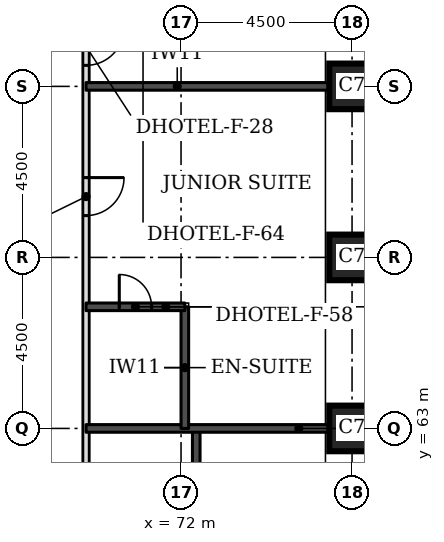
"""IFC4 building model, lengths in metres.
Left out: names, types, materials, properties, quantities, classifications, styles, units other than length and angle.
Written with IfcOpenShell. Run it as: python <this file> out.ifc"""

import sys

from ifc_helpers import new_model, si_unit, direction, frame, frame_2d, origin, origin_2d, place, context, subcontext, project, spatial, rectangle, extrude, element, fill, save


model = new_model("IFC4")
c1 = context("Model", 3, precision=1e-05, world=origin(), true_north=direction((0.0, 1.0)))
c2 = subcontext(c1, "Body", "Model", "MODEL_VIEW")
j1 = project(units=[si_unit("LENGTHUNIT", "METRE"), si_unit("PLANEANGLEUNIT", "RADIAN")], contexts=[c1])
p1 = place(None, origin())
s1 = spatial("IfcSite", under=j1, at=p1, CompositionType="ELEMENT")
p2 = place(p1, origin())
s2 = spatial("IfcBuilding", under=s1, at=p2, CompositionType="ELEMENT")
p3 = place(p2, frame((0.0, 0.0, 42.9)))
s3 = spatial("IfcBuildingStorey", under=s2, at=p3, CompositionType="ELEMENT", Elevation=42.9)
for number, where, z_axis, x_axis in (
    (1, (76.5, 63.0, 0.0), (0.0, 0.0, 1.0), (1.0, 0.0, 0.0)),
    (2, (76.5, 67.5, 0.0), (0.0, 0.0, 1.0), (1.0, 0.0, 0.0)),
    (3, (76.5, 72.0, 0.0), (0.0, 0.0, 1.0), (1.0, 0.0, 0.0)),
):
    element("IfcColumn", number, at=place(p3, frame(where, z_axis=z_axis, x_axis=x_axis)), inside=s3, PredefinedType="COLUMN", context=c2, shape_type="SweptSolid", body=[
        extrude(rectangle(XDim=1.2, YDim=1.2, at=origin_2d()), origin(), (0.0, 0.0, 1.0), 3.3),
    ])
p4 = place(p3, frame((69.5, 47.5, 0.0), z_axis=(0.0, 0.0, 1.0), x_axis=(0.0, 1.0, 0.0)))
e4 = element("IfcWall", 4, at=p4, inside=s3, PredefinedType="PARTITIONING", context=c2, shape_type="SweptSolid", body=[
    extrude(rectangle(XDim=26.5, YDim=0.15, at=frame_2d((13.25, 0.0))), origin(), (0.0, 0.0, 1.0), 3.08),
])
p5 = place(p4, frame((25.053, 0.0, 0.0)))
e5 = element("IfcOpeningElement", 5, at=p5, cuts=e4, PredefinedType="OPENING", context=c2, shape_type="SweptSolid", body=[
    extrude(rectangle(XDim=1.0, YDim=2.1, at=frame_2d((0.5, 1.05))), frame((0.0, 0.085, 0.0), z_axis=(0.0, -1.0, 0.0), x_axis=(1.0, 0.0, 0.0)), (0.0, 0.0, 1.0), 0.17),
])
p6 = place(p4, frame((21.1, 0.0, 0.0)))
e6 = element("IfcOpeningElement", 6, at=p6, cuts=e4, PredefinedType="OPENING", context=c2, shape_type="SweptSolid", body=[
    extrude(rectangle(XDim=1.0, YDim=2.1, at=frame_2d((0.5, 1.05))), frame((0.0, 0.085, 0.0), z_axis=(0.0, -1.0, 0.0), x_axis=(1.0, 0.0, 0.0)), (0.0, 0.0, 1.0), 0.17),
])
p7 = place(p4, frame((8.75, 0.0, 0.0)))
e7 = element("IfcOpeningElement", 7, at=p7, cuts=e4, PredefinedType="OPENING", context=c2, shape_type="SweptSolid", body=[
    extrude(rectangle(XDim=1.1, YDim=2.1, at=frame_2d((0.55, 1.05))), frame((0.0, 0.085, 0.0), z_axis=(0.0, -1.0, 0.0), x_axis=(1.0, 0.0, 0.0)), (0.0, 0.0, 1.0), 0.17),
])
p8 = place(p4, frame((5.05, 0.0, 0.0)))
e8 = element("IfcOpeningElement", 8, at=p8, cuts=e4, PredefinedType="OPENING", context=c2, shape_type="SweptSolid", body=[
    extrude(rectangle(XDim=1.0, YDim=2.1, at=frame_2d((0.5, 1.05))), frame((0.0, 0.085, 0.0), z_axis=(0.0, -1.0, 0.0), x_axis=(1.0, 0.0, 0.0)), (0.0, 0.0, 1.0), 0.17),
])
p9 = place(p4, frame((0.447, 0.0, 0.0)))
e9 = element("IfcOpeningElement", 9, at=p9, cuts=e4, PredefinedType="OPENING", context=c2, shape_type="SweptSolid", body=[
    extrude(rectangle(XDim=1.0, YDim=2.1, at=frame_2d((0.5, 1.05))), frame((0.0, 0.085, 0.0), z_axis=(0.0, -1.0, 0.0), x_axis=(1.0, 0.0, 0.0)), (0.0, 0.0, 1.0), 0.17),
])
p10 = place(p3, frame((72.4, 59.6, 0.0), z_axis=(0.0, 0.0, 1.0), x_axis=(0.0, 1.0, 0.0)))
e10 = element("IfcWall", 10, at=p10, inside=s3, PredefinedType="SOLIDWALL", context=c2, shape_type="SweptSolid", body=[
    extrude(rectangle(XDim=3.4, YDim=0.2, at=frame_2d((1.7, 0.0))), origin(), (0.0, 0.0, 1.0), 3.08),
])
p11 = place(p3, frame((69.5, 63.0, 0.0), z_axis=(0.0, 0.0, 1.0), x_axis=(1.0, 0.0, 0.0)))
e11 = element("IfcWall", 11, at=p11, inside=s3, PredefinedType="SOLIDWALL", context=c2, shape_type="SweptSolid", body=[
    extrude(rectangle(XDim=6.4, YDim=0.2, at=frame_2d((3.2, 0.0))), origin(), (0.0, 0.0, 1.0), 3.08),
])
p12 = place(p3, frame((72.1, 63.0, 0.0), z_axis=(0.0, 0.0, 1.0), x_axis=(0.0, 1.0, 0.0)))
e12 = element("IfcWall", 12, at=p12, inside=s3, PredefinedType="SOLIDWALL", context=c2, shape_type="SweptSolid", body=[
    extrude(rectangle(XDim=3.2, YDim=0.2, at=frame_2d((1.6, 0.0))), origin(), (0.0, 0.0, 1.0), 3.08),
])
p13 = place(p3, frame((69.5, 66.2, 0.0), z_axis=(0.0, 0.0, 1.0), x_axis=(1.0, 0.0, 0.0)))
e13 = element("IfcWall", 13, at=p13, inside=s3, PredefinedType="SOLIDWALL", context=c2, shape_type="SweptSolid", body=[
    extrude(rectangle(XDim=2.6, YDim=0.2, at=frame_2d((1.3, 0.0))), origin(), (0.0, 0.0, 1.0), 3.08),
])
p14 = place(p13, frame((0.875, 0.0, 0.0)))
e14 = element("IfcOpeningElement", 14, at=p14, cuts=e13, PredefinedType="OPENING", context=c2, shape_type="SweptSolid", body=[
    extrude(rectangle(XDim=0.85, YDim=2.1, at=frame_2d((0.425, 1.05))), frame((0.0, 0.11, 0.0), z_axis=(0.0, -1.0, 0.0), x_axis=(1.0, 0.0, 0.0)), (0.0, 0.0, 1.0), 0.22),
])
p15 = place(p3, frame((69.5, 72.0, 0.0), z_axis=(0.0, 0.0, 1.0), x_axis=(1.0, 0.0, 0.0)))
e15 = element("IfcWall", 15, at=p15, inside=s3, PredefinedType="SOLIDWALL", context=c2, shape_type="SweptSolid", body=[
    extrude(rectangle(XDim=6.4, YDim=0.2, at=frame_2d((3.2, 0.0))), origin(), (0.0, 0.0, 1.0), 3.08),
])
p16 = place(p5, frame((1.0, 0.0, 0.0), z_axis=(0.0, 0.0, 1.0), x_axis=(-1.0, 0.0, 0.0)))
e16 = element("IfcDoor", 16, at=p16, inside=s3, OperationType="SINGLE_SWING_LEFT", PredefinedType="DOOR", context=c2, shape_type="SweptSolid", body=[
    extrude(rectangle(XDim=1.0, YDim=2.1, at=frame_2d((0.5, 1.05))), frame((0.0, 0.025, 0.0), z_axis=(0.0, -1.0, 0.0), x_axis=(1.0, 0.0, 0.0)), (0.0, 0.0, 1.0), 0.05),
])
fill(e5, e16)
p17 = place(p6, frame((1.0, 0.0, 0.0), z_axis=(0.0, 0.0, 1.0), x_axis=(-1.0, 0.0, 0.0)))
e17 = element("IfcDoor", 17, at=p17, inside=s3, OperationType="SINGLE_SWING_LEFT", PredefinedType="DOOR", context=c2, shape_type="SweptSolid", body=[
    extrude(rectangle(XDim=1.0, YDim=2.1, at=frame_2d((0.5, 1.05))), frame((0.0, 0.025, 0.0), z_axis=(0.0, -1.0, 0.0), x_axis=(1.0, 0.0, 0.0)), (0.0, 0.0, 1.0), 0.05),
])
fill(e6, e17)
p18 = place(p14, origin())
e18 = element("IfcDoor", 18, at=p18, inside=s3, OperationType="SINGLE_SWING_LEFT", PredefinedType="DOOR", context=c2, shape_type="SweptSolid", body=[
    extrude(rectangle(XDim=0.85, YDim=2.1, at=frame_2d((0.425, 1.05))), frame((0.0, 0.025, 0.0), z_axis=(0.0, -1.0, 0.0), x_axis=(1.0, 0.0, 0.0)), (0.0, 0.0, 1.0), 0.05),
])
fill(e14, e18)
save(model, sys.argv[1])
